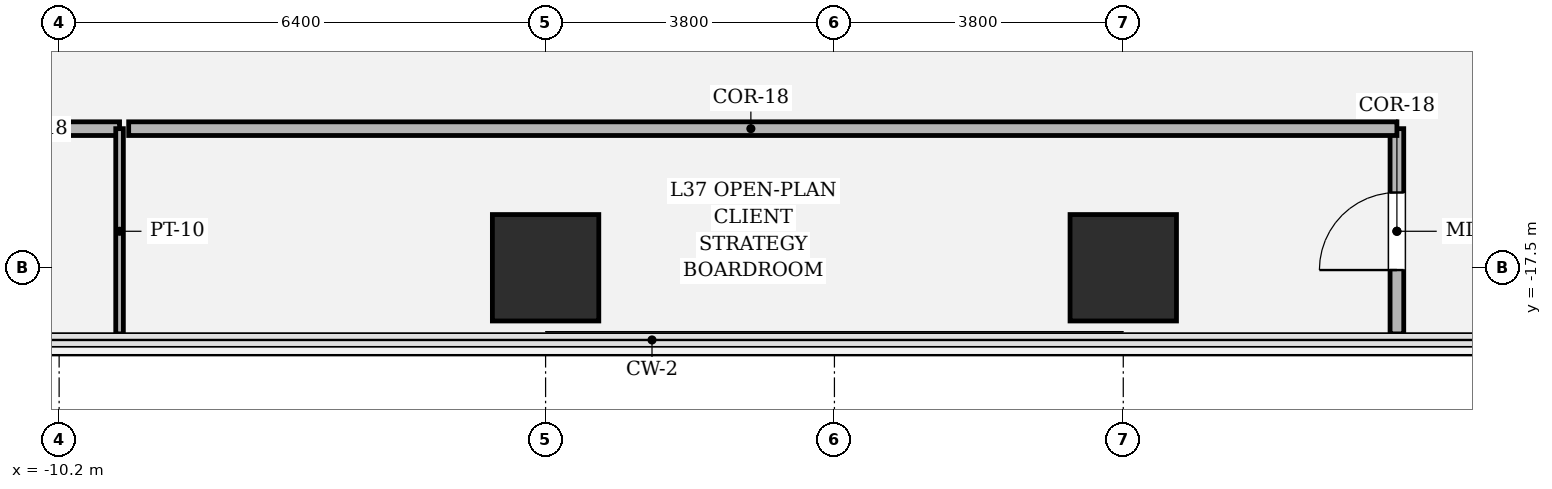
"""IFC4 building model, lengths in metres.
Left out: names, types, materials, properties, quantities, classifications, styles, units other than length and angle.
Written with IfcOpenShell. Run it as: python <this file> out.ifc"""

import sys

from ifc_helpers import new_model, si_unit, direction, frame, frame_2d, origin, origin_2d, place, context, subcontext, project, spatial, rectangle, hollow_rectangle, extrude, element, fill, save


model = new_model("IFC4")
c1 = context("Model", 3, precision=1e-05, world=origin(), true_north=direction((0.0, 1.0)))
c2 = subcontext(c1, "Body", "Model", "MODEL_VIEW")
j1 = project(units=[si_unit("LENGTHUNIT", "METRE"), si_unit("PLANEANGLEUNIT", "RADIAN")], contexts=[c1])
p1 = place(None, origin())
s1 = spatial("IfcSite", under=j1, at=p1, CompositionType="ELEMENT")
p2 = place(p1, origin())
s2 = spatial("IfcBuilding", under=s1, at=p2, CompositionType="ELEMENT")
p3 = place(p2, frame((0.0, 0.0, 160.05)))
s3 = spatial("IfcBuildingStorey", under=s2, at=p3, CompositionType="ELEMENT", Elevation=160.05)
for number, where, z_axis, x_axis in (
    (1, (-3.8, -17.5, 0.0), (0.0, 0.0, 1.0), (1.0, 0.0, 0.0)),
    (2, (3.8, -17.5, 0.0), (0.0, 0.0, 1.0), (1.0, 0.0, 0.0)),
):
    element("IfcColumn", number, at=place(p3, frame(where, z_axis=z_axis, x_axis=x_axis)), inside=s3, PredefinedType="COLUMN", context=c2, shape_type="SweptSolid", body=[
        extrude(hollow_rectangle(XDim=1.4, YDim=1.4, WallThickness=0.042, at=origin_2d()), origin(), (0.0, 0.0, 1.0), 4.05),
    ])
p4 = place(p3, frame((-12.77, -15.67, 0.0), z_axis=(0.0, 0.0, 1.0), x_axis=(1.0, 0.0, 0.0)))
e3 = element("IfcWall", 3, at=p4, inside=s3, PredefinedType="PARTITIONING", context=c2, shape_type="SweptSolid", body=[
    extrude(rectangle(XDim=3.365, YDim=0.18, at=frame_2d((1.683, 0.0))), origin(), (0.0, 0.0, 1.0), 3.174),
])
p5 = place(p4, frame((1.173, 0.0, 0.0)))
e4 = element("IfcOpeningElement", 4, at=p5, cuts=e3, PredefinedType="OPENING", context=c2, shape_type="SweptSolid", body=[
    extrude(rectangle(XDim=1.02, YDim=2.2, at=frame_2d((0.51, 1.1))), frame((0.0, 0.1, 0.0), z_axis=(0.0, -1.0, 0.0), x_axis=(1.0, 0.0, 0.0)), (0.0, 0.0, 1.0), 0.2),
])
p6 = place(p3, frame((-9.405, -15.67, 0.0), z_axis=(0.0, 0.0, 1.0), x_axis=(0.0, -1.0, 0.0)))
e5 = element("IfcWall", 5, at=p6, inside=s3, PredefinedType="PARTITIONING", context=c2, shape_type="SweptSolid", body=[
    extrude(rectangle(XDim=2.7, YDim=0.1, at=frame_2d((1.35, 0.0))), origin(), (0.0, 0.0, 1.0), 3.174),
])
p7 = place(p3, frame((7.4, -15.67, 0.0), z_axis=(0.0, 0.0, 1.0), x_axis=(0.0, -1.0, 0.0)))
e6 = element("IfcWall", 6, at=p7, inside=s3, PredefinedType="PARTITIONING", context=c2, shape_type="SweptSolid", body=[
    extrude(rectangle(XDim=2.7, YDim=0.18, at=frame_2d((1.35, 0.0))), origin(), (0.0, 0.0, 1.0), 3.174),
])
p8 = place(p7, frame((0.84, 0.0, 0.0)))
e7 = element("IfcOpeningElement", 7, at=p8, cuts=e6, PredefinedType="OPENING", context=c2, shape_type="SweptSolid", body=[
    extrude(rectangle(XDim=1.02, YDim=2.2, at=frame_2d((0.51, 1.1))), frame((0.0, 0.1, 0.0), z_axis=(0.0, -1.0, 0.0), x_axis=(1.0, 0.0, 0.0)), (0.0, 0.0, 1.0), 0.2),
])
p9 = place(p3, frame((-9.285, -15.67, 0.0), z_axis=(0.0, 0.0, 1.0), x_axis=(1.0, 0.0, 0.0)))
e8 = element("IfcWall", 8, at=p9, inside=s3, PredefinedType="PARTITIONING", context=c2, shape_type="SweptSolid", body=[
    extrude(rectangle(XDim=16.685, YDim=0.18, at=frame_2d((8.342, 0.0))), origin(), (0.0, 0.0, 1.0), 3.174),
])
p10 = place(p8, origin())
e9 = element("IfcDoor", 9, at=p10, inside=s3, OperationType="SINGLE_SWING_RIGHT", PredefinedType="DOOR", context=c2, shape_type="SweptSolid", body=[
    extrude(rectangle(XDim=1.02, YDim=2.2, at=frame_2d((0.51, 1.1))), frame((0.0, 0.025, 0.0), z_axis=(0.0, -1.0, 0.0), x_axis=(1.0, 0.0, 0.0)), (0.0, 0.0, 1.0), 0.05),
])
fill(e7, e9)
save(model, sys.argv[1])
